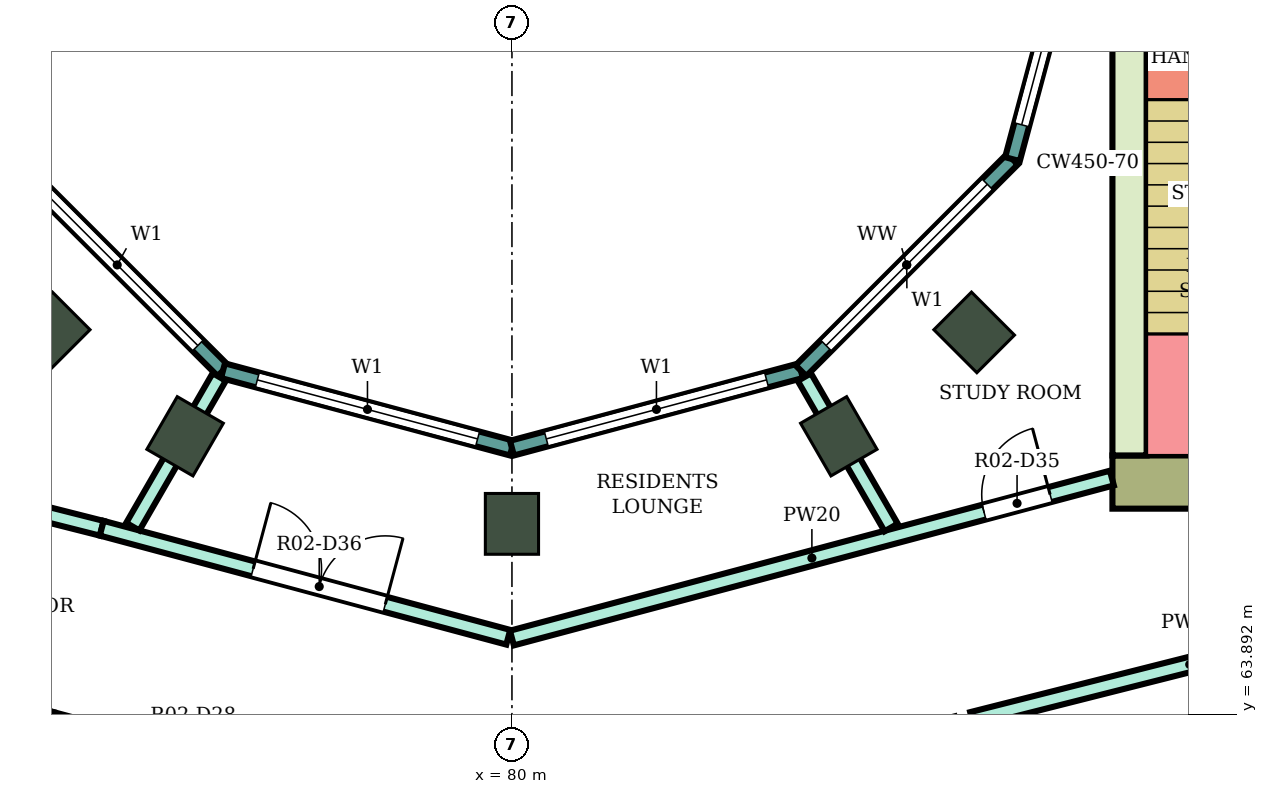
"""IFC4 building model, lengths in metres.
Left out: names, types, materials, properties, quantities, classifications, styles, units other than length and angle.
Written with IfcOpenShell. Run it as: python <this file> out.ifc"""

import sys

from ifc_helpers import new_model, si_unit, direction, frame, frame_2d, origin, origin_2d, place, context, subcontext, project, spatial, rectangle, extrude, element, fill, save


model = new_model("IFC4")
c1 = context("Model", 3, precision=1e-05, world=origin(), true_north=direction((0.0, 1.0)))
c2 = subcontext(c1, "Body", "Model", "MODEL_VIEW")
j1 = project(units=[si_unit("LENGTHUNIT", "METRE"), si_unit("PLANEANGLEUNIT", "RADIAN")], contexts=[c1])
p1 = place(None, origin())
s1 = spatial("IfcSite", under=j1, at=p1, CompositionType="ELEMENT")
p2 = place(p1, origin())
s2 = spatial("IfcBuilding", under=s1, at=p2, CompositionType="ELEMENT")
p3 = place(p2, frame((0.0, 0.0, 174.1)))
s3 = spatial("IfcBuildingStorey", under=s2, at=p3, CompositionType="ELEMENT", Elevation=174.1)
for number, where, z_axis, x_axis in (
    (1, (73.919, 68.919, 0.0), (0.0, 0.0, 1.0), (-0.707, -0.707, 0.0)),
    (2, (75.7, 67.552, 0.0), (0.0, 0.0, 1.0), (-0.5, -0.866, 0.0)),
    (3, (80.0, 66.4, 0.0), (0.0, 0.0, 1.0), (0.0, -1.0, 0.0)),
    (4, (84.3, 67.552, 0.0), (0.0, 0.0, 1.0), (0.5, -0.866, 0.0)),
    (5, (86.081, 68.919, 0.0), (0.0, 0.0, 1.0), (0.707, -0.707, 0.0)),
):
    element("IfcColumn", number, at=place(p3, frame(where, z_axis=z_axis, x_axis=x_axis)), inside=s3, PredefinedType="COLUMN", context=c2, shape_type="SweptSolid", body=[
        extrude(rectangle(XDim=0.8, YDim=0.7, at=origin_2d()), origin(), (0.0, 0.0, 1.0), 4.1),
    ])
p4 = place(p3, frame((87.9, 66.95, 0.0), z_axis=(0.0, 0.0, 1.0), x_axis=(1.0, 0.0, 0.0)))
e6 = element("IfcWall", 6, at=p4, inside=s3, PredefinedType="SHEAR", context=c2, shape_type="SweptSolid", body=[
    extrude(rectangle(XDim=14.8, YDim=0.7, at=frame_2d((7.4, 0.0))), origin(), (0.0, 0.0, 1.0), 3.78),
])
p5 = place(p4, frame((4.2, 0.0, 0.0)))
e7 = element("IfcOpeningElement", 7, at=p5, cuts=e6, PredefinedType="OPENING", context=c2, shape_type="SweptSolid", body=[
    extrude(rectangle(XDim=2.4, YDim=2.4, at=frame_2d((1.2, 1.2))), frame((0.0, 0.36, 0.0), z_axis=(0.0, -1.0, 0.0), x_axis=(1.0, 0.0, 0.0)), (0.0, 0.0, 1.0), 0.72),
])
p6 = place(p3, frame((88.125, 67.3, 0.0), z_axis=(0.0, 0.0, 1.0), x_axis=(0.0, 1.0, 0.0)))
e8 = element("IfcWall", 8, at=p6, inside=s3, PredefinedType="SHEAR", context=c2, shape_type="SweptSolid", body=[
    extrude(rectangle(XDim=7.7, YDim=0.45, at=frame_2d((3.85, 0.0))), origin(), (0.0, 0.0, 1.0), 3.78),
])
p7 = place(p3, frame((73.415, 71.198, 0.0), z_axis=(0.0, 0.0, 1.0), x_axis=(0.707106781187, -0.707106781187, 0.0)))
e9 = element("IfcWall", 9, at=p7, inside=s3, PredefinedType="NOTDEFINED", context=c2, shape_type="SweptSolid", body=[
    extrude(rectangle(XDim=3.936, YDim=0.2, at=frame_2d((1.968, 0.0))), origin(), (0.0, 0.0, 1.0), 4.1),
])
p8 = place(p7, frame((0.468, 0.0, 0.9)))
e10 = element("IfcOpeningElement", 10, at=p8, cuts=e9, PredefinedType="OPENING", context=c2, shape_type="SweptSolid", body=[
    extrude(rectangle(XDim=3.0, YDim=2.3, at=frame_2d((1.5, 1.15))), frame((0.0, 0.11, 0.0), z_axis=(0.0, -1.0, 0.0), x_axis=(1.0, 0.0, 0.0)), (0.0, 0.0, 1.0), 0.22),
])
p9 = place(p3, frame((76.198, 68.415, 0.0), z_axis=(0.0, 0.0, 1.0), x_axis=(0.965933654434, -0.258789828301, 0.0)))
e11 = element("IfcWall", 11, at=p9, inside=s3, PredefinedType="NOTDEFINED", context=c2, shape_type="SweptSolid", body=[
    extrude(rectangle(XDim=3.936, YDim=0.2, at=frame_2d((1.968, 0.0))), origin(), (0.0, 0.0, 1.0), 4.1),
])
p10 = place(p9, frame((0.468, 0.0, 0.9)))
e12 = element("IfcOpeningElement", 12, at=p10, cuts=e11, PredefinedType="OPENING", context=c2, shape_type="SweptSolid", body=[
    extrude(rectangle(XDim=3.0, YDim=2.3, at=frame_2d((1.5, 1.15))), frame((0.0, 0.11, 0.0), z_axis=(0.0, -1.0, 0.0), x_axis=(1.0, 0.0, 0.0)), (0.0, 0.0, 1.0), 0.22),
])
p11 = place(p3, frame((80.0, 67.396, 0.0), z_axis=(0.0, 0.0, 1.0), x_axis=(0.965933654434, 0.258789828301, 0.0)))
e13 = element("IfcWall", 13, at=p11, inside=s3, PredefinedType="NOTDEFINED", context=c2, shape_type="SweptSolid", body=[
    extrude(rectangle(XDim=3.936, YDim=0.2, at=frame_2d((1.968, 0.0))), origin(), (0.0, 0.0, 1.0), 4.1),
])
p12 = place(p11, frame((0.468, 0.0, 0.9)))
e14 = element("IfcOpeningElement", 14, at=p12, cuts=e13, PredefinedType="OPENING", context=c2, shape_type="SweptSolid", body=[
    extrude(rectangle(XDim=3.0, YDim=2.3, at=frame_2d((1.5, 1.15))), frame((0.0, 0.11, 0.0), z_axis=(0.0, -1.0, 0.0), x_axis=(1.0, 0.0, 0.0)), (0.0, 0.0, 1.0), 0.22),
])
p13 = place(p3, frame((83.802, 68.415, 0.0), z_axis=(0.0, 0.0, 1.0), x_axis=(0.707106781187, 0.707106781187, 0.0)))
e15 = element("IfcWall", 15, at=p13, inside=s3, PredefinedType="NOTDEFINED", context=c2, shape_type="SweptSolid", body=[
    extrude(rectangle(XDim=3.936, YDim=0.2, at=frame_2d((1.968, 0.0))), origin(), (0.0, 0.0, 1.0), 4.1),
])
p14 = place(p13, frame((0.468, 0.0, 0.9)))
e16 = element("IfcOpeningElement", 16, at=p14, cuts=e15, PredefinedType="OPENING", context=c2, shape_type="SweptSolid", body=[
    extrude(rectangle(XDim=3.0, YDim=2.3, at=frame_2d((1.5, 1.15))), frame((0.0, 0.11, 0.0), z_axis=(0.0, -1.0, 0.0), x_axis=(1.0, 0.0, 0.0)), (0.0, 0.0, 1.0), 0.22),
])
p15 = place(p3, frame((86.585, 71.198, 0.0), z_axis=(0.0, 0.0, 1.0), x_axis=(0.258789828301, 0.965933654434, 0.0)))
e17 = element("IfcWall", 17, at=p15, inside=s3, PredefinedType="NOTDEFINED", context=c2, shape_type="SweptSolid", body=[
    extrude(rectangle(XDim=3.936, YDim=0.2, at=frame_2d((1.968, 0.0))), origin(), (0.0, 0.0, 1.0), 4.1),
])
p16 = place(p15, frame((0.468, 0.0, 0.9)))
e18 = element("IfcOpeningElement", 18, at=p16, cuts=e17, PredefinedType="OPENING", context=c2, shape_type="SweptSolid", body=[
    extrude(rectangle(XDim=3.0, YDim=2.3, at=frame_2d((1.5, 1.15))), frame((0.0, 0.11, 0.0), z_axis=(0.0, -1.0, 0.0), x_axis=(1.0, 0.0, 0.0)), (0.0, 0.0, 1.0), 0.22),
])
p17 = place(p3, frame((69.86, 64.86, 0.0), z_axis=(0.0, 0.0, 1.0), x_axis=(0.96942980222, -0.245368821506, 0.0)))
e19 = element("IfcWall", 19, at=p17, inside=s3, PredefinedType="PARTITIONING", context=c2, shape_type="SweptSolid", body=[
    extrude(rectangle(XDim=4.216, YDim=0.2, at=frame_2d((2.108, 0.0))), origin(), (0.0, 0.0, 1.0), 3.65),
])
p18 = place(p3, frame((72.1, 66.975, 0.0), z_axis=(0.0, 0.0, 1.0), x_axis=(0.969471314457, -0.245204752086, 0.0)))
e20 = element("IfcWall", 20, at=p18, inside=s3, PredefinedType="PARTITIONING", context=c2, shape_type="SweptSolid", body=[
    extrude(rectangle(XDim=2.582, YDim=0.2, at=frame_2d((1.291, 0.0))), origin(), (0.0, 0.0, 1.0), 3.65),
])
p19 = place(p18, frame((0.841, 0.0, 0.0)))
e21 = element("IfcOpeningElement", 21, at=p19, cuts=e20, PredefinedType="OPENING", context=c2, shape_type="SweptSolid", body=[
    extrude(rectangle(XDim=0.9, YDim=2.1, at=frame_2d((0.45, 1.05))), frame((0.0, 0.11, 0.0), z_axis=(0.0, -1.0, 0.0), x_axis=(1.0, 0.0, 0.0)), (0.0, 0.0, 1.0), 0.22),
])
p20 = place(p3, frame((73.947, 63.826, 0.0), z_axis=(0.0, 0.0, 1.0), x_axis=(0.965908253407, -0.258884619088, 0.0)))
e22 = element("IfcWall", 22, at=p20, inside=s3, PredefinedType="PARTITIONING", context=c2, shape_type="SweptSolid", body=[
    extrude(rectangle(XDim=6.217, YDim=0.2, at=frame_2d((3.108, 0.0))), origin(), (0.0, 0.0, 1.0), 3.65),
])
p21 = place(p20, frame((1.424, 0.0, 0.0)))
e23 = element("IfcOpeningElement", 23, at=p21, cuts=e22, PredefinedType="OPENING", context=c2, shape_type="SweptSolid", body=[
    extrude(rectangle(XDim=1.0, YDim=2.1, at=frame_2d((0.5, 1.05))), frame((0.0, 0.11, 0.0), z_axis=(0.0, -1.0, 0.0), x_axis=(1.0, 0.0, 0.0)), (0.0, 0.0, 1.0), 0.22),
])
p22 = place(p3, frame((74.603, 66.342, 0.0), z_axis=(0.0, 0.0, 1.0), x_axis=(0.965895298152, -0.258932950796, 0.0)))
e24 = element("IfcWall", 24, at=p22, inside=s3, PredefinedType="PARTITIONING", context=c2, shape_type="SweptSolid", body=[
    extrude(rectangle(XDim=5.538, YDim=0.2, at=frame_2d((2.769, 0.0))), origin(), (0.0, 0.0, 1.0), 3.65),
])
p23 = place(p22, frame((2.062, 0.0, 0.0)))
e25 = element("IfcOpeningElement", 25, at=p23, cuts=e24, PredefinedType="OPENING", context=c2, shape_type="SweptSolid", body=[
    extrude(rectangle(XDim=1.8, YDim=2.1, at=frame_2d((0.9, 1.05))), frame((0.0, 0.11, 0.0), z_axis=(0.0, -1.0, 0.0), x_axis=(1.0, 0.0, 0.0)), (0.0, 0.0, 1.0), 0.22),
])
p24 = place(p3, frame((75.012, 66.363, 0.0), z_axis=(0.0, 0.0, 1.0), x_axis=(0.500168489725, 0.86592810434, 0.0)))
e26 = element("IfcWall", 26, at=p24, inside=s3, PredefinedType="PARTITIONING", context=c2, shape_type="SweptSolid", body=[
    extrude(rectangle(XDim=2.274, YDim=0.2, at=frame_2d((1.137, 0.0))), origin(), (0.0, 0.0, 1.0), 3.65),
])
p25 = place(p3, frame((80.0, 64.898, 0.0), z_axis=(0.0, 0.0, 1.0), x_axis=(0.966237419782, 0.257653349704, 0.0)))
e27 = element("IfcWall", 27, at=p25, inside=s3, PredefinedType="PARTITIONING", context=c2, shape_type="SweptSolid", body=[
    extrude(rectangle(XDim=8.169, YDim=0.2, at=frame_2d((4.084, 0.0))), origin(), (0.0, 0.0, 1.0), 3.65),
])
p26 = place(p25, frame((6.428, 0.0, 0.0)))
e28 = element("IfcOpeningElement", 28, at=p26, cuts=e27, PredefinedType="OPENING", context=c2, shape_type="SweptSolid", body=[
    extrude(rectangle(XDim=0.9, YDim=2.1, at=frame_2d((0.45, 1.05))), frame((0.0, 0.11, 0.0), z_axis=(0.0, -1.0, 0.0), x_axis=(1.0, 0.0, 0.0)), (0.0, 0.0, 1.0), 0.22),
])
p27 = place(p3, frame((83.847, 68.331, 0.0), z_axis=(0.0, 0.0, 1.0), x_axis=(0.499851978358, -0.866110847255, 0.0)))
e29 = element("IfcWall", 29, at=p27, inside=s3, PredefinedType="PARTITIONING", context=c2, shape_type="SweptSolid", body=[
    extrude(rectangle(XDim=2.284, YDim=0.2, at=frame_2d((1.142, 0.0))), origin(), (0.0, 0.0, 1.0), 3.65),
])
p28 = place(p3, frame((86.053, 63.826, 0.0), z_axis=(0.0, 0.0, 1.0), x_axis=(0.969490004987, 0.245130843083, 0.0)))
e30 = element("IfcWall", 30, at=p28, inside=s3, PredefinedType="PARTITIONING", context=c2, shape_type="SweptSolid", body=[
    extrude(rectangle(XDim=5.908, YDim=0.2, at=frame_2d((2.954, 0.0))), origin(), (0.0, 0.0, 1.0), 3.65),
])
p29 = place(p8, origin())
e31 = element("IfcWindow", 31, at=p29, inside=s3, PartitioningType="SINGLE_PANEL", PredefinedType="WINDOW", context=c2, shape_type="SweptSolid", body=[
    extrude(rectangle(XDim=3.0, YDim=2.3, at=frame_2d((1.5, 1.15))), frame((0.0, 0.03, 0.0), z_axis=(0.0, -1.0, 0.0), x_axis=(1.0, 0.0, 0.0)), (0.0, 0.0, 1.0), 0.06),
])
fill(e10, e31)
p30 = place(p10, origin())
e32 = element("IfcWindow", 32, at=p30, inside=s3, PartitioningType="SINGLE_PANEL", PredefinedType="WINDOW", context=c2, shape_type="SweptSolid", body=[
    extrude(rectangle(XDim=3.0, YDim=2.3, at=frame_2d((1.5, 1.15))), frame((0.0, 0.03, 0.0), z_axis=(0.0, -1.0, 0.0), x_axis=(1.0, 0.0, 0.0)), (0.0, 0.0, 1.0), 0.06),
])
fill(e12, e32)
p31 = place(p12, origin())
e33 = element("IfcWindow", 33, at=p31, inside=s3, PartitioningType="SINGLE_PANEL", PredefinedType="WINDOW", context=c2, shape_type="SweptSolid", body=[
    extrude(rectangle(XDim=3.0, YDim=2.3, at=frame_2d((1.5, 1.15))), frame((0.0, 0.03, 0.0), z_axis=(0.0, -1.0, 0.0), x_axis=(1.0, 0.0, 0.0)), (0.0, 0.0, 1.0), 0.06),
])
fill(e14, e33)
p32 = place(p14, origin())
e34 = element("IfcWindow", 34, at=p32, inside=s3, PartitioningType="SINGLE_PANEL", PredefinedType="WINDOW", context=c2, shape_type="SweptSolid", body=[
    extrude(rectangle(XDim=3.0, YDim=2.3, at=frame_2d((1.5, 1.15))), frame((0.0, 0.03, 0.0), z_axis=(0.0, -1.0, 0.0), x_axis=(1.0, 0.0, 0.0)), (0.0, 0.0, 1.0), 0.06),
])
fill(e16, e34)
p33 = place(p16, origin())
e35 = element("IfcWindow", 35, at=p33, inside=s3, PartitioningType="SINGLE_PANEL", PredefinedType="WINDOW", context=c2, shape_type="SweptSolid", body=[
    extrude(rectangle(XDim=3.0, YDim=2.3, at=frame_2d((1.5, 1.15))), frame((0.0, 0.03, 0.0), z_axis=(0.0, -1.0, 0.0), x_axis=(1.0, 0.0, 0.0)), (0.0, 0.0, 1.0), 0.06),
])
fill(e18, e35)
p34 = place(p26, origin())
e36 = element("IfcDoor", 36, at=p34, inside=s3, OperationType="SINGLE_SWING_RIGHT", PredefinedType="DOOR", context=c2, shape_type="SweptSolid", body=[
    extrude(rectangle(XDim=0.9, YDim=2.1, at=frame_2d((0.45, 1.05))), frame((0.0, 0.025, 0.0), z_axis=(0.0, -1.0, 0.0), x_axis=(1.0, 0.0, 0.0)), (0.0, 0.0, 1.0), 0.05),
])
fill(e28, e36)
p35 = place(p23, origin())
e37 = element("IfcDoor", 37, at=p35, inside=s3, OperationType="DOUBLE_DOOR_SINGLE_SWING", PredefinedType="DOOR", context=c2, shape_type="SweptSolid", body=[
    extrude(rectangle(XDim=1.8, YDim=2.1, at=frame_2d((0.9, 1.05))), frame((0.0, 0.025, 0.0), z_axis=(0.0, -1.0, 0.0), x_axis=(1.0, 0.0, 0.0)), (0.0, 0.0, 1.0), 0.05),
])
fill(e25, e37)
save(model, sys.argv[1])
